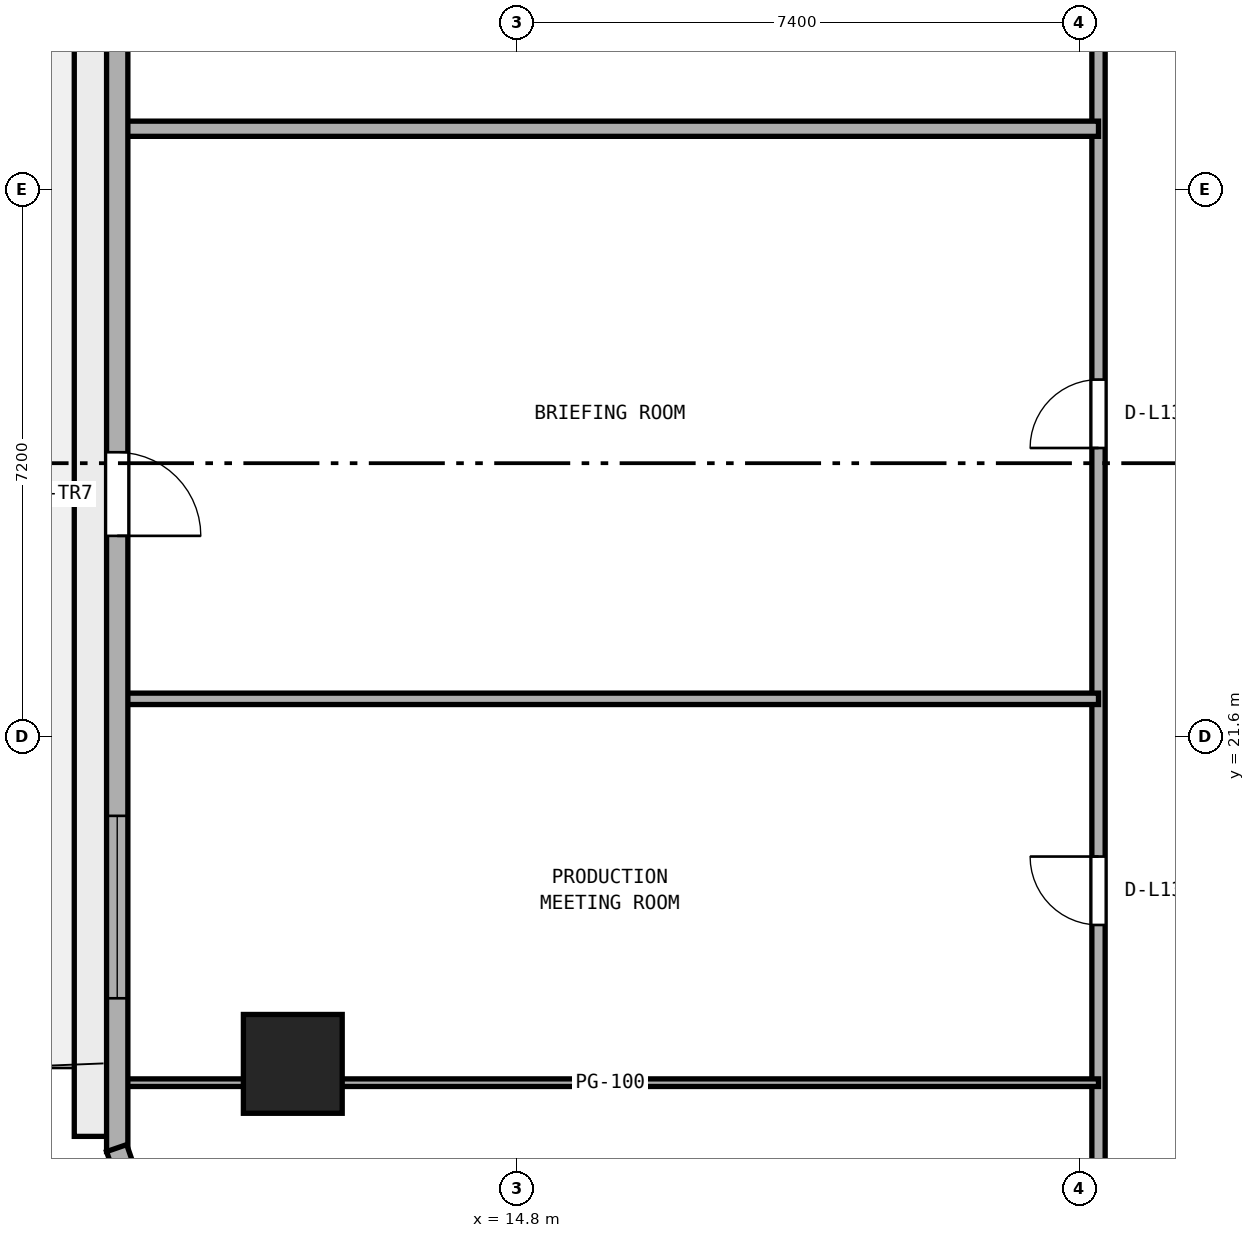
"""IFC4 building model, lengths in metres.
Left out: names, types, materials, properties, quantities, classifications, styles, units other than length and angle.
Written with IfcOpenShell. Run it as: python <this file> out.ifc"""

import sys

from ifc_helpers import new_model, si_unit, direction, frame, frame_2d, origin, origin_2d, place, context, subcontext, project, spatial, rectangle, extrude, element, fill, save


model = new_model("IFC4")
c1 = context("Model", 3, precision=1e-05, world=origin(), true_north=direction((0.0, 1.0)))
c2 = subcontext(c1, "Body", "Model", "MODEL_VIEW")
j1 = project(units=[si_unit("LENGTHUNIT", "METRE"), si_unit("PLANEANGLEUNIT", "RADIAN")], contexts=[c1])
p1 = place(None, origin())
s1 = spatial("IfcSite", under=j1, at=p1, CompositionType="ELEMENT")
p2 = place(p1, origin())
s2 = spatial("IfcBuilding", under=s1, at=p2, CompositionType="ELEMENT")
p3 = place(p2, frame((0.0, 0.0, 55.4)))
s3 = spatial("IfcBuildingStorey", under=s2, at=p3, CompositionType="ELEMENT", Elevation=55.4)
p4 = place(p3, frame((11.85, 17.298, 0.0), z_axis=(0.0, 0.0, 1.0), x_axis=(1.0, 0.0, 0.0)))
e1 = element("IfcColumn", 1, at=p4, inside=s3, PredefinedType="COLUMN", context=c2, shape_type="SweptSolid", body=[
    extrude(rectangle(XDim=1.3, YDim=1.3, at=origin_2d()), origin(), (0.0, 0.0, 1.0), 3.8),
])
p5 = place(p3, frame((22.45, 14.05, 0.0), z_axis=(0.0, 0.0, 1.0), x_axis=(0.0, 1.0, 0.0)))
e2 = element("IfcWall", 2, at=p5, inside=s3, PredefinedType="PARTITIONING", context=c2, shape_type="SweptSolid", body=[
    extrude(rectangle(XDim=22.3, YDim=0.175, at=frame_2d((11.15, 0.0))), origin(), (0.0, 0.0, 1.0), 3.525),
])
p6 = place(p5, frame((5.075, 0.0, 0.0)))
e3 = element("IfcOpeningElement", 3, at=p6, cuts=e2, PredefinedType="OPENING", context=c2, shape_type="SweptSolid", body=[
    extrude(rectangle(XDim=0.9, YDim=2.1, at=frame_2d((0.45, 1.05))), frame((0.0, 0.097, 0.0), z_axis=(0.0, -1.0, 0.0), x_axis=(1.0, 0.0, 0.0)), (0.0, 0.0, 1.0), 0.195),
])
p7 = place(p5, frame((11.35, 0.0, 0.0)))
e4 = element("IfcOpeningElement", 4, at=p7, cuts=e2, PredefinedType="OPENING", context=c2, shape_type="SweptSolid", body=[
    extrude(rectangle(XDim=0.9, YDim=2.1, at=frame_2d((0.45, 1.05))), frame((0.0, 0.097, 0.0), z_axis=(0.0, -1.0, 0.0), x_axis=(1.0, 0.0, 0.0)), (0.0, 0.0, 1.0), 0.195),
])
p8 = place(p5, frame((16.975, 0.0, 0.0)))
e5 = element("IfcOpeningElement", 5, at=p8, cuts=e2, PredefinedType="OPENING", context=c2, shape_type="SweptSolid", body=[
    extrude(rectangle(XDim=0.9, YDim=2.1, at=frame_2d((0.45, 1.05))), frame((0.0, 0.097, 0.0), z_axis=(0.0, -1.0, 0.0), x_axis=(1.0, 0.0, 0.0)), (0.0, 0.0, 1.0), 0.195),
])
p9 = place(p3, frame((9.605, 17.05, 0.0), z_axis=(0.0, 0.0, 1.0), x_axis=(1.0, 0.0, 0.0)))
e6 = element("IfcWall", 6, at=p9, inside=s3, PredefinedType="PARTITIONING", context=c2, shape_type="SweptSolid", body=[
    extrude(rectangle(XDim=12.845, YDim=0.1, at=frame_2d((6.422, 0.0))), origin(), (0.0, 0.0, 1.0), 3.525),
])
p10 = place(p3, frame((9.605, 22.1, 0.0), z_axis=(0.0, 0.0, 1.0), x_axis=(1.0, 0.0, 0.0)))
e7 = element("IfcWall", 7, at=p10, inside=s3, PredefinedType="PARTITIONING", context=c2, shape_type="SweptSolid", body=[
    extrude(rectangle(XDim=12.845, YDim=0.15, at=frame_2d((6.422, 0.0))), origin(), (0.0, 0.0, 1.0), 3.525),
])
p11 = place(p3, frame((9.605, 29.6, 0.0), z_axis=(0.0, 0.0, 1.0), x_axis=(1.0, 0.0, 0.0)))
e8 = element("IfcWall", 8, at=p11, inside=s3, PredefinedType="PARTITIONING", context=c2, shape_type="SweptSolid", body=[
    extrude(rectangle(XDim=12.845, YDim=0.2, at=frame_2d((6.422, 0.0))), origin(), (0.0, 0.0, 1.0), 3.525),
])
p12 = place(p3, frame((9.54, 33.444, 0.0), z_axis=(0.0, 0.0, 1.0), x_axis=(0.0, -1.0, 0.0)))
e9 = element("IfcWall", 9, at=p12, inside=s3, PredefinedType="STANDARD", context=c2, shape_type="SweptSolid", body=[
    extrude(rectangle(XDim=17.301, YDim=0.28, at=frame_2d((8.65, 0.0))), origin(), (0.0, 0.0, 1.0), 3.525),
])
p13 = place(p12, frame((8.1, 0.0, 0.0)))
e10 = element("IfcOpeningElement", 10, at=p13, cuts=e9, PredefinedType="OPENING", context=c2, shape_type="SweptSolid", body=[
    extrude(rectangle(XDim=1.1, YDim=2.2, at=frame_2d((0.55, 1.1))), frame((0.0, 0.15, 0.0), z_axis=(0.0, -1.0, 0.0), x_axis=(1.0, 0.0, 0.0)), (0.0, 0.0, 1.0), 0.3),
])
p14 = place(p12, frame((12.884, 0.0, 0.9)))
e11 = element("IfcOpeningElement", 11, at=p14, cuts=e9, PredefinedType="OPENING", context=c2, shape_type="SweptSolid", body=[
    extrude(rectangle(XDim=2.4, YDim=1.75, at=frame_2d((1.2, 0.875))), frame((0.0, 0.15, 0.0), z_axis=(0.0, -1.0, 0.0), x_axis=(1.0, 0.0, 0.0)), (0.0, 0.0, 1.0), 0.3),
])
p15 = place(p3, frame((9.532, 16.189, 0.0), z_axis=(0.0, 0.0, 1.0), x_axis=(0.32708309668, -0.944995580871, 0.0)))
e12 = element("IfcWall", 12, at=p15, inside=s3, PredefinedType="STANDARD", context=c2, shape_type="SweptSolid", body=[
    extrude(rectangle(XDim=2.748, YDim=0.28, at=frame_2d((1.374, 0.0))), origin(), (0.0, 0.0, 1.0), 3.525),
])
p16 = place(p6, origin())
e13 = element("IfcDoor", 13, at=p16, inside=s3, OperationType="SINGLE_SWING_RIGHT", PredefinedType="DOOR", context=c2, shape_type="SweptSolid", body=[
    extrude(rectangle(XDim=0.9, YDim=2.1, at=frame_2d((0.45, 1.05))), frame((0.0, 0.025, 0.0), z_axis=(0.0, -1.0, 0.0), x_axis=(1.0, 0.0, 0.0)), (0.0, 0.0, 1.0), 0.05),
])
fill(e3, e13)
p17 = place(p7, origin())
e14 = element("IfcDoor", 14, at=p17, inside=s3, OperationType="SINGLE_SWING_LEFT", PredefinedType="DOOR", context=c2, shape_type="SweptSolid", body=[
    extrude(rectangle(XDim=0.9, YDim=2.1, at=frame_2d((0.45, 1.05))), frame((0.0, 0.025, 0.0), z_axis=(0.0, -1.0, 0.0), x_axis=(1.0, 0.0, 0.0)), (0.0, 0.0, 1.0), 0.05),
])
fill(e4, e14)
p18 = place(p13, origin())
e15 = element("IfcDoor", 15, at=p18, inside=s3, OperationType="SINGLE_SWING_RIGHT", PredefinedType="DOOR", context=c2, shape_type="SweptSolid", body=[
    extrude(rectangle(XDim=1.1, YDim=2.2, at=frame_2d((0.55, 1.1))), frame((0.0, 0.025, 0.0), z_axis=(0.0, -1.0, 0.0), x_axis=(1.0, 0.0, 0.0)), (0.0, 0.0, 1.0), 0.05),
])
fill(e10, e15)
p19 = place(p14, origin())
e16 = element("IfcWindow", 16, at=p19, inside=s3, PartitioningType="SINGLE_PANEL", PredefinedType="WINDOW", context=c2, shape_type="SweptSolid", body=[
    extrude(rectangle(XDim=2.4, YDim=1.75, at=frame_2d((1.2, 0.875))), frame((0.0, 0.03, 0.0), z_axis=(0.0, -1.0, 0.0), x_axis=(1.0, 0.0, 0.0)), (0.0, 0.0, 1.0), 0.06),
])
fill(e11, e16)
save(model, sys.argv[1])
